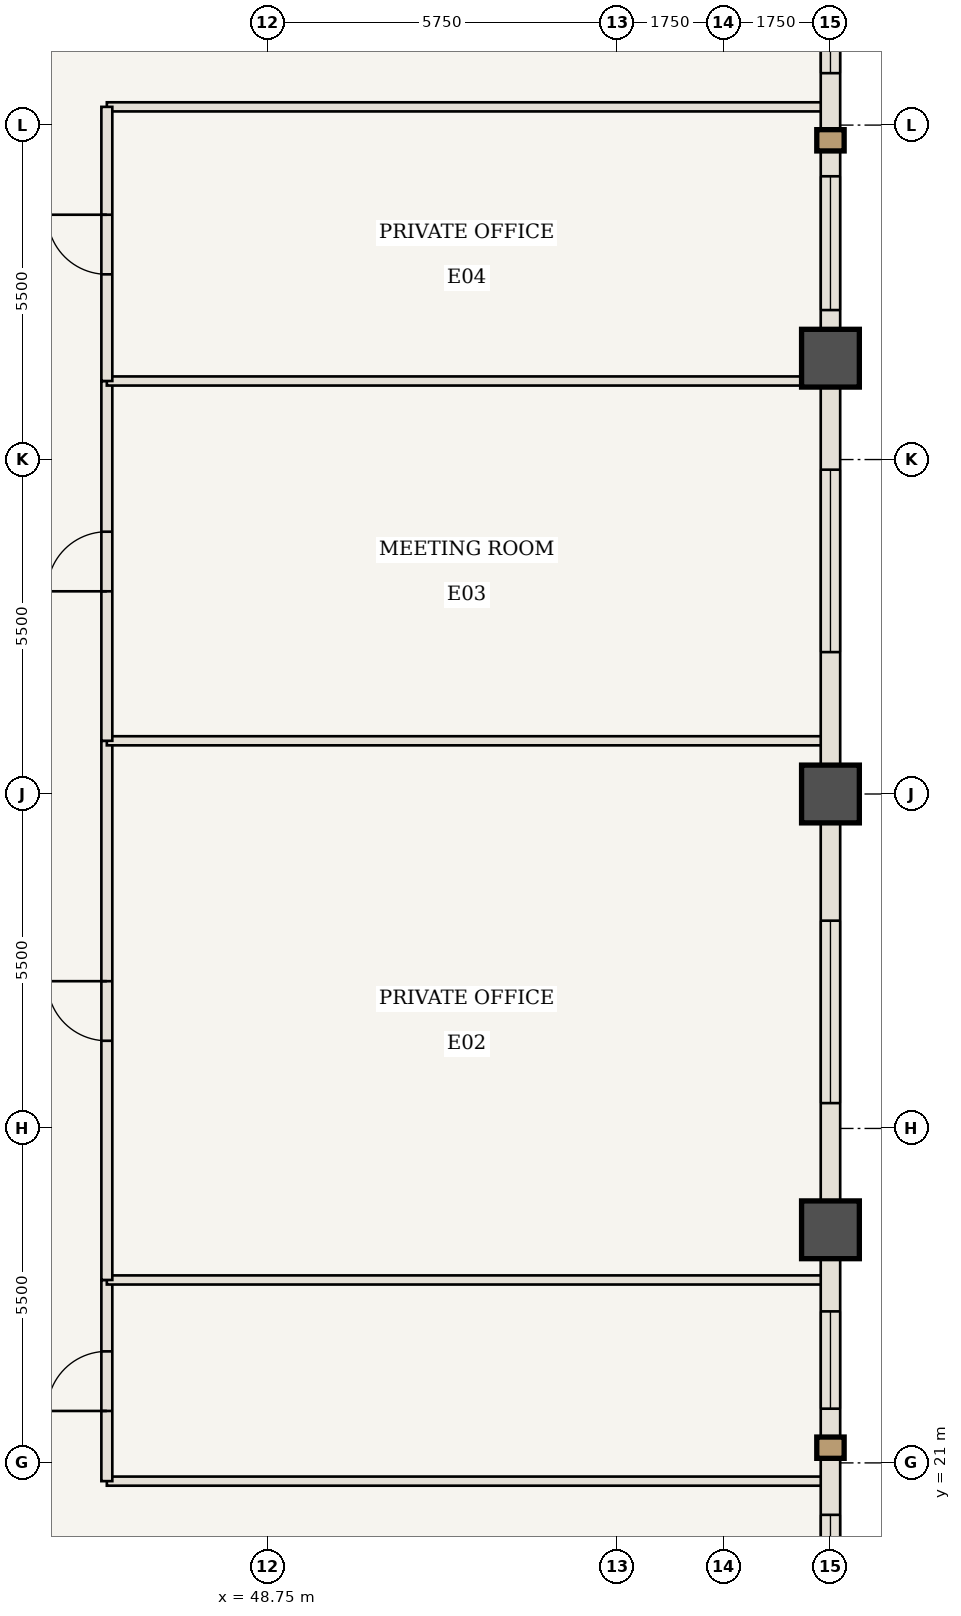
"""IFC4 building model, lengths in metres.
Left out: names, types, materials, properties, quantities, classifications, styles, units other than length and angle.
Written with IfcOpenShell. Run it as: python <this file> out.ifc"""

import sys

from ifc_helpers import new_model, si_unit, direction, frame, frame_2d, origin, origin_2d, place, context, subcontext, project, spatial, rectangle, extrude, element, fill, save


model = new_model("IFC4")
c1 = context("Model", 3, precision=1e-05, world=origin(), true_north=direction((0.0, 1.0)))
c2 = subcontext(c1, "Body", "Model", "MODEL_VIEW")
j1 = project(units=[si_unit("LENGTHUNIT", "METRE"), si_unit("PLANEANGLEUNIT", "RADIAN")], contexts=[c1])
p1 = place(None, origin())
s1 = spatial("IfcSite", under=j1, at=p1, CompositionType="ELEMENT")
p2 = place(p1, origin())
s2 = spatial("IfcBuilding", under=s1, at=p2, CompositionType="ELEMENT")
p3 = place(p2, frame((0.0, 0.0, 152.95)))
s3 = spatial("IfcBuildingStorey", under=s2, at=p3, CompositionType="ELEMENT", Elevation=152.95)
for number, where, z_axis, x_axis in (
    (1, (58.0, 24.833, 0.0), (0.0, 0.0, 1.0), (1.0, 0.0, 0.0)),
    (2, (58.0, 32.0, 0.0), (0.0, 0.0, 1.0), (1.0, 0.0, 0.0)),
    (3, (58.0, 39.167, 0.0), (0.0, 0.0, 1.0), (1.0, 0.0, 0.0)),
):
    element("IfcColumn", number, at=place(p3, frame(where, z_axis=z_axis, x_axis=x_axis)), inside=s3, PredefinedType="COLUMN", context=c2, shape_type="SweptSolid", body=[
        extrude(rectangle(XDim=0.95, YDim=0.95, at=origin_2d()), origin(), (0.0, 0.0, 1.0), 3.85),
    ])
for number, where, z_axis, x_axis in (
    (4, (46.1, 20.7, 0.0), (0.0, 0.0, 1.0), (1.0, 0.0, 0.0)),
    (5, (46.1, 43.3, 0.0), (0.0, 0.0, 1.0), (1.0, 0.0, 0.0)),
):
    element("IfcWall", number, at=place(p3, frame(where, z_axis=z_axis, x_axis=x_axis)), inside=s3, PredefinedType="STANDARD", context=c2, shape_type="SweptSolid", body=[
        extrude(rectangle(XDim=11.84, YDim=0.15, at=frame_2d((5.92, 0.0))), origin(), (0.0, 0.0, 1.0), 3.065),
    ])
p4 = place(p3, frame((46.1, 20.7, 0.0), z_axis=(0.0, 0.0, 1.0), x_axis=(0.0, 1.0, 0.0)))
e6 = element("IfcWall", 6, at=p4, inside=s3, PredefinedType="STANDARD", context=c2, shape_type="SweptSolid", body=[
    extrude(rectangle(XDim=3.308, YDim=0.18, at=frame_2d((1.654, 0.0))), origin(), (0.0, 0.0, 1.0), 3.685),
])
p5 = place(p4, frame((1.154, 0.0, 0.0)))
e7 = element("IfcOpeningElement", 7, at=p5, cuts=e6, PredefinedType="OPENING", context=c2, shape_type="SweptSolid", body=[
    extrude(rectangle(XDim=0.98, YDim=2.2, at=frame_2d((0.49, 1.1))), frame((0.0, 0.1, 0.0), z_axis=(0.0, -1.0, 0.0), x_axis=(1.0, 0.0, 0.0)), (0.0, 0.0, 1.0), 0.2),
])
p6 = place(p3, frame((46.1, 24.008, 0.0), z_axis=(0.0, 0.0, 1.0), x_axis=(1.0, 0.0, 0.0)))
e8 = element("IfcWall", 8, at=p6, inside=s3, PredefinedType="STANDARD", context=c2, shape_type="SweptSolid", body=[
    extrude(rectangle(XDim=11.84, YDim=0.15, at=frame_2d((5.92, 0.0))), origin(), (0.0, 0.0, 1.0), 3.685),
])
p7 = place(p3, frame((46.1, 24.008, 0.0), z_axis=(0.0, 0.0, 1.0), x_axis=(0.0, 1.0, 0.0)))
e9 = element("IfcWall", 9, at=p7, inside=s3, PredefinedType="STANDARD", context=c2, shape_type="SweptSolid", body=[
    extrude(rectangle(XDim=8.867, YDim=0.18, at=frame_2d((4.433, 0.0))), origin(), (0.0, 0.0, 1.0), 3.685),
])
p8 = place(p7, frame((3.933, 0.0, 0.0)))
e10 = element("IfcOpeningElement", 10, at=p8, cuts=e9, PredefinedType="OPENING", context=c2, shape_type="SweptSolid", body=[
    extrude(rectangle(XDim=0.98, YDim=2.2, at=frame_2d((0.49, 1.1))), frame((0.0, 0.1, 0.0), z_axis=(0.0, -1.0, 0.0), x_axis=(1.0, 0.0, 0.0)), (0.0, 0.0, 1.0), 0.2),
])
p9 = place(p3, frame((46.1, 32.875, 0.0), z_axis=(0.0, 0.0, 1.0), x_axis=(1.0, 0.0, 0.0)))
e11 = element("IfcWall", 11, at=p9, inside=s3, PredefinedType="STANDARD", context=c2, shape_type="SweptSolid", body=[
    extrude(rectangle(XDim=11.84, YDim=0.15, at=frame_2d((5.92, 0.0))), origin(), (0.0, 0.0, 1.0), 3.685),
])
p10 = place(p3, frame((46.1, 32.875, 0.0), z_axis=(0.0, 0.0, 1.0), x_axis=(0.0, 1.0, 0.0)))
e12 = element("IfcWall", 12, at=p10, inside=s3, PredefinedType="STANDARD", context=c2, shape_type="SweptSolid", body=[
    extrude(rectangle(XDim=5.917, YDim=0.18, at=frame_2d((2.958, 0.0))), origin(), (0.0, 0.0, 1.0), 3.685),
])
p11 = place(p10, frame((2.458, 0.0, 0.0)))
e13 = element("IfcOpeningElement", 13, at=p11, cuts=e12, PredefinedType="OPENING", context=c2, shape_type="SweptSolid", body=[
    extrude(rectangle(XDim=0.98, YDim=2.2, at=frame_2d((0.49, 1.1))), frame((0.0, 0.1, 0.0), z_axis=(0.0, -1.0, 0.0), x_axis=(1.0, 0.0, 0.0)), (0.0, 0.0, 1.0), 0.2),
])
p12 = place(p3, frame((46.1, 38.792, 0.0), z_axis=(0.0, 0.0, 1.0), x_axis=(1.0, 0.0, 0.0)))
e14 = element("IfcWall", 14, at=p12, inside=s3, PredefinedType="STANDARD", context=c2, shape_type="SweptSolid", body=[
    extrude(rectangle(XDim=11.84, YDim=0.15, at=frame_2d((5.92, 0.0))), origin(), (0.0, 0.0, 1.0), 3.685),
])
p13 = place(p3, frame((46.1, 38.792, 0.0), z_axis=(0.0, 0.0, 1.0), x_axis=(0.0, 1.0, 0.0)))
e15 = element("IfcWall", 15, at=p13, inside=s3, PredefinedType="STANDARD", context=c2, shape_type="SweptSolid", body=[
    extrude(rectangle(XDim=4.508, YDim=0.18, at=frame_2d((2.254, 0.0))), origin(), (0.0, 0.0, 1.0), 3.685),
])
p14 = place(p13, frame((1.754, 0.0, 0.0)))
e16 = element("IfcOpeningElement", 16, at=p14, cuts=e15, PredefinedType="OPENING", context=c2, shape_type="SweptSolid", body=[
    extrude(rectangle(XDim=0.98, YDim=2.2, at=frame_2d((0.49, 1.1))), frame((0.0, 0.1, 0.0), z_axis=(0.0, -1.0, 0.0), x_axis=(1.0, 0.0, 0.0)), (0.0, 0.0, 1.0), 0.2),
])
p15 = place(p3, frame((58.0, 24.833, 0.0), z_axis=(0.0, 0.0, 1.0), x_axis=(0.0, -1.0, 0.0)))
e17 = element("IfcWall", 17, at=p15, inside=s3, PredefinedType="USERDEFINED", context=c2, shape_type="SweptSolid", body=[
    extrude(rectangle(XDim=7.167, YDim=0.32, at=frame_2d((3.583, 0.0))), origin(), (0.0, 0.0, 1.0), 2.885),
])
p16 = place(p15, frame((1.342, 0.0, 0.85)))
e18 = element("IfcOpeningElement", 18, at=p16, cuts=e17, PredefinedType="OPENING", context=c2, shape_type="SweptSolid", body=[
    extrude(rectangle(XDim=1.6, YDim=1.835, at=frame_2d((0.8, 0.917))), frame((0.0, 0.17, 0.0), z_axis=(0.0, -1.0, 0.0), x_axis=(1.0, 0.0, 0.0)), (0.0, 0.0, 1.0), 0.34),
])
p17 = place(p15, frame((4.688, 0.0, 0.85)))
e19 = element("IfcOpeningElement", 19, at=p17, cuts=e17, PredefinedType="OPENING", context=c2, shape_type="SweptSolid", body=[
    extrude(rectangle(XDim=1.6, YDim=1.835, at=frame_2d((0.8, 0.917))), frame((0.0, 0.17, 0.0), z_axis=(0.0, -1.0, 0.0), x_axis=(1.0, 0.0, 0.0)), (0.0, 0.0, 1.0), 0.34),
])
p18 = place(p3, frame((58.0, 32.0, 0.0), z_axis=(0.0, 0.0, 1.0), x_axis=(0.0, -1.0, 0.0)))
e20 = element("IfcWall", 20, at=p18, inside=s3, PredefinedType="USERDEFINED", context=c2, shape_type="SweptSolid", body=[
    extrude(rectangle(XDim=7.167, YDim=0.32, at=frame_2d((3.583, 0.0))), origin(), (0.0, 0.0, 1.0), 2.885),
])
p19 = place(p18, frame((2.083, 0.0, 0.85)))
e21 = element("IfcOpeningElement", 21, at=p19, cuts=e20, PredefinedType="OPENING", context=c2, shape_type="SweptSolid", body=[
    extrude(rectangle(XDim=3.0, YDim=1.835, at=frame_2d((1.5, 0.917))), frame((0.0, 0.17, 0.0), z_axis=(0.0, -1.0, 0.0), x_axis=(1.0, 0.0, 0.0)), (0.0, 0.0, 1.0), 0.34),
])
p20 = place(p3, frame((58.0, 39.167, 0.0), z_axis=(0.0, 0.0, 1.0), x_axis=(0.0, -1.0, 0.0)))
e22 = element("IfcWall", 22, at=p20, inside=s3, PredefinedType="USERDEFINED", context=c2, shape_type="SweptSolid", body=[
    extrude(rectangle(XDim=7.167, YDim=0.32, at=frame_2d((3.583, 0.0))), origin(), (0.0, 0.0, 1.0), 2.885),
])
p21 = place(p20, frame((1.833, 0.0, 0.85)))
e23 = element("IfcOpeningElement", 23, at=p21, cuts=e22, PredefinedType="OPENING", context=c2, shape_type="SweptSolid", body=[
    extrude(rectangle(XDim=3.0, YDim=1.835, at=frame_2d((1.5, 0.917))), frame((0.0, 0.17, 0.0), z_axis=(0.0, -1.0, 0.0), x_axis=(1.0, 0.0, 0.0)), (0.0, 0.0, 1.0), 0.34),
])
p22 = place(p3, frame((58.0, 46.333, 0.0), z_axis=(0.0, 0.0, 1.0), x_axis=(0.0, -1.0, 0.0)))
e24 = element("IfcWall", 24, at=p22, inside=s3, PredefinedType="USERDEFINED", context=c2, shape_type="SweptSolid", body=[
    extrude(rectangle(XDim=7.167, YDim=0.32, at=frame_2d((3.583, 0.0))), origin(), (0.0, 0.0, 1.0), 2.885),
])
p23 = place(p22, frame((0.879, 0.0, 0.85)))
e25 = element("IfcOpeningElement", 25, at=p23, cuts=e24, PredefinedType="OPENING", context=c2, shape_type="SweptSolid", body=[
    extrude(rectangle(XDim=1.6, YDim=1.835, at=frame_2d((0.8, 0.917))), frame((0.0, 0.17, 0.0), z_axis=(0.0, -1.0, 0.0), x_axis=(1.0, 0.0, 0.0)), (0.0, 0.0, 1.0), 0.34),
])
p24 = place(p22, frame((4.175, 0.0, 0.85)))
e26 = element("IfcOpeningElement", 26, at=p24, cuts=e24, PredefinedType="OPENING", context=c2, shape_type="SweptSolid", body=[
    extrude(rectangle(XDim=2.2, YDim=1.835, at=frame_2d((1.1, 0.917))), frame((0.0, 0.17, 0.0), z_axis=(0.0, -1.0, 0.0), x_axis=(1.0, 0.0, 0.0)), (0.0, 0.0, 1.0), 0.34),
])
p25 = place(p5, origin())
e27 = element("IfcDoor", 27, at=p25, inside=s3, OperationType="SINGLE_SWING_LEFT", PredefinedType="DOOR", context=c2, shape_type="SweptSolid", body=[
    extrude(rectangle(XDim=0.98, YDim=2.2, at=frame_2d((0.49, 1.1))), frame((0.0, 0.025, 0.0), z_axis=(0.0, -1.0, 0.0), x_axis=(1.0, 0.0, 0.0)), (0.0, 0.0, 1.0), 0.05),
])
fill(e7, e27)
p26 = place(p8, origin())
e28 = element("IfcDoor", 28, at=p26, inside=s3, OperationType="SINGLE_SWING_RIGHT", PredefinedType="DOOR", context=c2, shape_type="SweptSolid", body=[
    extrude(rectangle(XDim=0.98, YDim=2.2, at=frame_2d((0.49, 1.1))), frame((0.0, 0.025, 0.0), z_axis=(0.0, -1.0, 0.0), x_axis=(1.0, 0.0, 0.0)), (0.0, 0.0, 1.0), 0.05),
])
fill(e10, e28)
p27 = place(p11, origin())
e29 = element("IfcDoor", 29, at=p27, inside=s3, OperationType="SINGLE_SWING_LEFT", PredefinedType="DOOR", context=c2, shape_type="SweptSolid", body=[
    extrude(rectangle(XDim=0.98, YDim=2.2, at=frame_2d((0.49, 1.1))), frame((0.0, 0.025, 0.0), z_axis=(0.0, -1.0, 0.0), x_axis=(1.0, 0.0, 0.0)), (0.0, 0.0, 1.0), 0.05),
])
fill(e13, e29)
p28 = place(p14, origin())
e30 = element("IfcDoor", 30, at=p28, inside=s3, OperationType="SINGLE_SWING_RIGHT", PredefinedType="DOOR", context=c2, shape_type="SweptSolid", body=[
    extrude(rectangle(XDim=0.98, YDim=2.2, at=frame_2d((0.49, 1.1))), frame((0.0, 0.025, 0.0), z_axis=(0.0, -1.0, 0.0), x_axis=(1.0, 0.0, 0.0)), (0.0, 0.0, 1.0), 0.05),
])
fill(e16, e30)
p29 = place(p16, origin())
e31 = element("IfcWindow", 31, at=p29, inside=s3, PartitioningType="SINGLE_PANEL", PredefinedType="WINDOW", context=c2, shape_type="SweptSolid", body=[
    extrude(rectangle(XDim=1.6, YDim=1.835, at=frame_2d((0.8, 0.917))), frame((0.0, 0.03, 0.0), z_axis=(0.0, -1.0, 0.0), x_axis=(1.0, 0.0, 0.0)), (0.0, 0.0, 1.0), 0.06),
])
fill(e18, e31)
p30 = place(p17, origin())
e32 = element("IfcWindow", 32, at=p30, inside=s3, PartitioningType="SINGLE_PANEL", PredefinedType="WINDOW", context=c2, shape_type="SweptSolid", body=[
    extrude(rectangle(XDim=1.6, YDim=1.835, at=frame_2d((0.8, 0.917))), frame((0.0, 0.03, 0.0), z_axis=(0.0, -1.0, 0.0), x_axis=(1.0, 0.0, 0.0)), (0.0, 0.0, 1.0), 0.06),
])
fill(e19, e32)
p31 = place(p19, origin())
e33 = element("IfcWindow", 33, at=p31, inside=s3, PartitioningType="SINGLE_PANEL", PredefinedType="WINDOW", context=c2, shape_type="SweptSolid", body=[
    extrude(rectangle(XDim=3.0, YDim=1.835, at=frame_2d((1.5, 0.917))), frame((0.0, 0.03, 0.0), z_axis=(0.0, -1.0, 0.0), x_axis=(1.0, 0.0, 0.0)), (0.0, 0.0, 1.0), 0.06),
])
fill(e21, e33)
p32 = place(p21, origin())
e34 = element("IfcWindow", 34, at=p32, inside=s3, PartitioningType="SINGLE_PANEL", PredefinedType="WINDOW", context=c2, shape_type="SweptSolid", body=[
    extrude(rectangle(XDim=3.0, YDim=1.835, at=frame_2d((1.5, 0.917))), frame((0.0, 0.03, 0.0), z_axis=(0.0, -1.0, 0.0), x_axis=(1.0, 0.0, 0.0)), (0.0, 0.0, 1.0), 0.06),
])
fill(e23, e34)
p33 = place(p23, origin())
e35 = element("IfcWindow", 35, at=p33, inside=s3, PartitioningType="SINGLE_PANEL", PredefinedType="WINDOW", context=c2, shape_type="SweptSolid", body=[
    extrude(rectangle(XDim=1.6, YDim=1.835, at=frame_2d((0.8, 0.917))), frame((0.0, 0.03, 0.0), z_axis=(0.0, -1.0, 0.0), x_axis=(1.0, 0.0, 0.0)), (0.0, 0.0, 1.0), 0.06),
])
fill(e25, e35)
p34 = place(p24, origin())
e36 = element("IfcWindow", 36, at=p34, inside=s3, PartitioningType="SINGLE_PANEL", PredefinedType="WINDOW", context=c2, shape_type="SweptSolid", body=[
    extrude(rectangle(XDim=2.2, YDim=1.835, at=frame_2d((1.1, 0.917))), frame((0.0, 0.03, 0.0), z_axis=(0.0, -1.0, 0.0), x_axis=(1.0, 0.0, 0.0)), (0.0, 0.0, 1.0), 0.06),
])
fill(e26, e36)
save(model, sys.argv[1])
